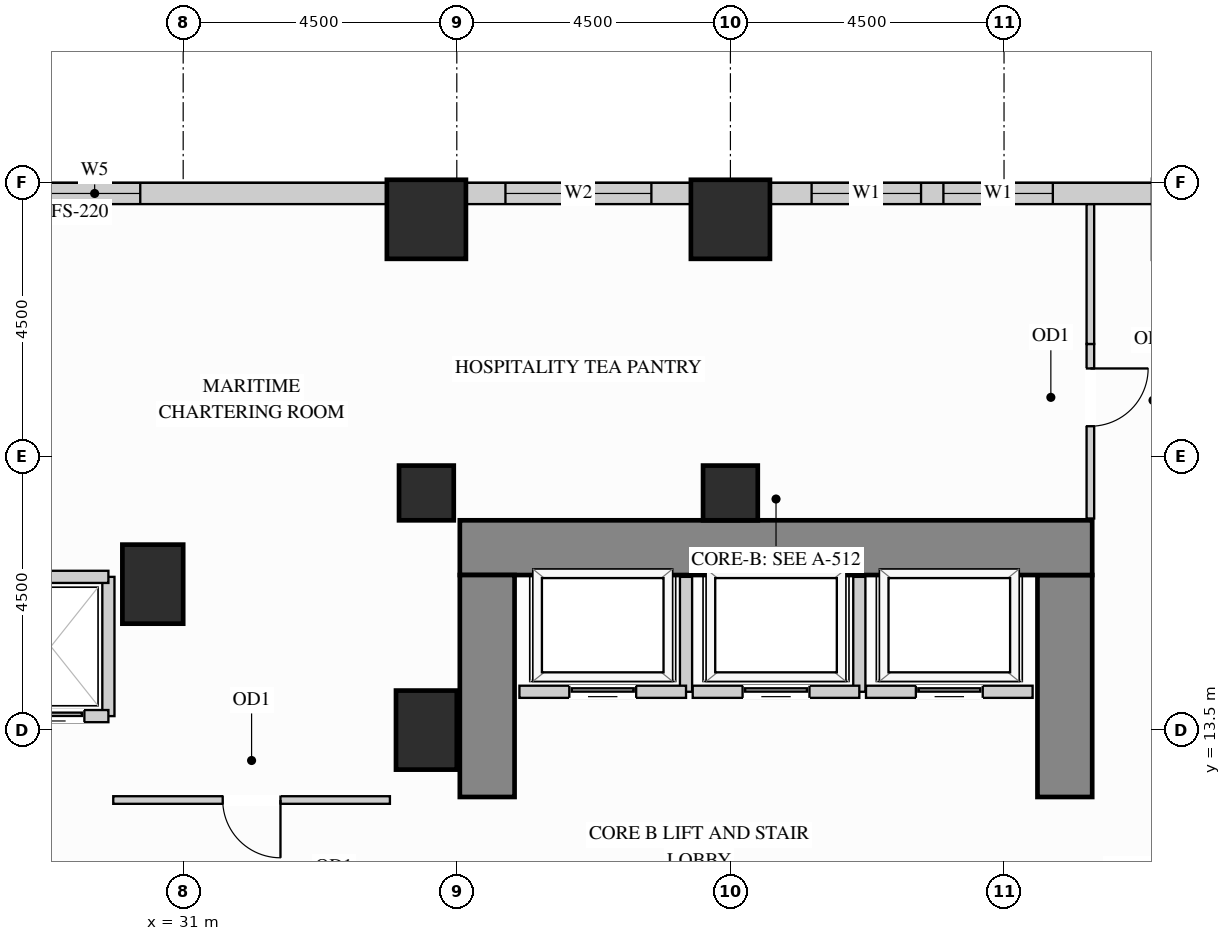
"""IFC4 building model, lengths in metres.
Left out: names, types, materials, properties, quantities, classifications, styles, units other than length and angle.
Written with IfcOpenShell. Run it as: python <this file> out.ifc"""

import sys

from ifc_helpers import new_model, si_unit, direction, frame, frame_2d, origin, origin_2d, place, context, subcontext, project, spatial, rectangle, extrude, source, transform, mapped, element, fill, save


model = new_model("IFC4")
c1 = context("Model", 3, precision=1e-05, world=origin(), true_north=direction((0.0, 1.0)))
c2 = subcontext(c1, "Body", "Model", "MODEL_VIEW")
j1 = project(units=[si_unit("LENGTHUNIT", "METRE"), si_unit("PLANEANGLEUNIT", "RADIAN")], contexts=[c1])
p1 = place(None, origin())
s1 = spatial("IfcSite", under=j1, at=p1, CompositionType="ELEMENT")
p2 = place(p1, origin())
s2 = spatial("IfcBuilding", under=s1, at=p2, CompositionType="ELEMENT")
p3 = place(p2, frame((0.0, 0.0, 40.5)))
s3 = spatial("IfcBuildingStorey", under=s2, at=p3, CompositionType="ELEMENT", Elevation=40.5)
m1 = source(origin(), c2, "Body", "SweptSolid", [
    extrude(rectangle(XDim=0.9, YDim=0.9, at=origin_2d()), origin(), (0.0, 0.0, 1.0), 3.38),
])
for number, where, z_axis, x_axis in (
    (1, (35.0, 17.4, 0.0), (0.0, 0.0, 1.0), (1.0, 0.0, 0.0)),
    (2, (40.0, 17.4, 0.0), (0.0, 0.0, 1.0), (1.0, 0.0, 0.0)),
):
    element("IfcColumn", number, at=place(p3, frame(where, z_axis=z_axis, x_axis=x_axis)), inside=s3, PredefinedType="COLUMN", context=c2, shape_type="MappedRepresentation", body=[
        mapped(m1, transform((0.0, 0.0, 0.0), x_axis=(1.0, 0.0, 0.0), y_axis=(0.0, 1.0, 0.0), z_axis=(0.0, 0.0, 1.0))),
    ])
m2 = source(origin(), c2, "Body", "SweptSolid", [
    extrude(rectangle(XDim=1.0, YDim=1.3, at=origin_2d()), origin(), (0.0, 0.0, 1.0), 3.38),
])
for number, where, z_axis, x_axis in (
    (3, (35.0, 13.5, 0.0), (0.0, 0.0, 1.0), (1.0, 0.0, 0.0)),
    (4, (30.5, 15.9, 0.0), (0.0, 0.0, 1.0), (1.0, 0.0, 0.0)),
):
    element("IfcColumn", number, at=place(p3, frame(where, z_axis=z_axis, x_axis=x_axis)), inside=s3, PredefinedType="COLUMN", context=c2, shape_type="MappedRepresentation", body=[
        mapped(m2, transform((0.0, 0.0, 0.0), x_axis=(1.0, 0.0, 0.0), y_axis=(0.0, 1.0, 0.0), z_axis=(0.0, 0.0, 1.0))),
    ])
m3 = source(origin(), c2, "Body", "SweptSolid", [
    extrude(rectangle(XDim=1.3, YDim=1.3, at=origin_2d()), origin(), (0.0, 0.0, 1.0), 3.38),
])
for number, where, z_axis, x_axis in (
    (5, (35.0, 21.9, 0.0), (0.0, 0.0, 1.0), (1.0, 0.0, 0.0)),
    (6, (40.0, 21.9, 0.0), (0.0, 0.0, 1.0), (1.0, 0.0, 0.0)),
):
    element("IfcColumn", number, at=place(p3, frame(where, z_axis=z_axis, x_axis=x_axis)), inside=s3, PredefinedType="COLUMN", context=c2, shape_type="MappedRepresentation", body=[
        mapped(m3, transform((0.0, 0.0, 0.0), x_axis=(1.0, 0.0, 0.0), y_axis=(0.0, 1.0, 0.0), z_axis=(0.0, 0.0, 1.0))),
    ])
m4 = source(origin(), c2, "Body", "SweptSolid", [
    extrude(rectangle(XDim=3.65, YDim=0.9, at=frame_2d((1.825, 0.0))), origin(), (0.0, 0.0, 1.0), 3.38),
])
p4 = place(p3, frame((45.5, 12.4, 0.0), z_axis=(0.0, 0.0, 1.0), x_axis=(0.0, 1.0, 0.0)))
e7 = element("IfcWall", 7, at=p4, inside=s3, PredefinedType="SHEAR", context=c2, shape_type="MappedRepresentation", body=[
    mapped(m4, transform((0.0, 0.0, 0.0), x_axis=(1.0, 0.0, 0.0), y_axis=(0.0, 1.0, 0.0), z_axis=(0.0, 0.0, 1.0))),
])
m5 = source(origin(), c2, "Body", "SweptSolid", [
    extrude(rectangle(XDim=10.4, YDim=0.9, at=frame_2d((5.2, 0.0))), origin(), (0.0, 0.0, 1.0), 3.38),
])
p5 = place(p3, frame((35.55, 16.5, 0.0), z_axis=(0.0, 0.0, 1.0), x_axis=(1.0, 0.0, 0.0)))
e8 = element("IfcWall", 8, at=p5, inside=s3, PredefinedType="SHEAR", context=c2, shape_type="MappedRepresentation", body=[
    mapped(m5, transform((0.0, 0.0, 0.0), x_axis=(1.0, 0.0, 0.0), y_axis=(0.0, 1.0, 0.0), z_axis=(0.0, 0.0, 1.0))),
])
p6 = place(p3, frame((36.0, 12.4, 0.0), z_axis=(0.0, 0.0, 1.0), x_axis=(0.0, 1.0, 0.0)))
e9 = element("IfcWall", 9, at=p6, inside=s3, PredefinedType="SHEAR", context=c2, shape_type="MappedRepresentation", body=[
    mapped(m4, transform((0.0, 0.0, 0.0), x_axis=(1.0, 0.0, 0.0), y_axis=(0.0, 1.0, 0.0), z_axis=(0.0, 0.0, 1.0))),
])
p7 = place(p3, frame((46.952, 22.325, 0.0), z_axis=(0.0, 0.0, 1.0), x_axis=(-1.0, 0.0, 0.0)))
e10 = element("IfcWall", 10, at=p7, inside=s3, PredefinedType="SOLIDWALL", context=c2, shape_type="SweptSolid", body=[
    extrude(rectangle(XDim=6.304, YDim=0.35, at=frame_2d((3.152, 0.0))), origin(), (0.0, 0.0, 1.0), 2.51),
])
p8 = place(p7, frame((1.649, 0.0, 0.78)))
e11 = element("IfcOpeningElement", 11, at=p8, cuts=e10, PredefinedType="OPENING", context=c2, shape_type="SweptSolid", body=[
    extrude(rectangle(XDim=1.8, YDim=1.55, at=frame_2d((0.9, 0.775))), frame((0.0, 0.185, 0.0), z_axis=(0.0, -1.0, 0.0), x_axis=(1.0, 0.0, 0.0)), (0.0, 0.0, 1.0), 0.37),
])
p9 = place(p7, frame((3.817, 0.0, 0.78)))
e12 = element("IfcOpeningElement", 12, at=p9, cuts=e10, PredefinedType="OPENING", context=c2, shape_type="SweptSolid", body=[
    extrude(rectangle(XDim=1.8, YDim=1.55, at=frame_2d((0.9, 0.775))), frame((0.0, 0.185, 0.0), z_axis=(0.0, -1.0, 0.0), x_axis=(1.0, 0.0, 0.0)), (0.0, 0.0, 1.0), 0.37),
])
p10 = place(p3, frame((39.352, 22.325, 0.0), z_axis=(0.0, 0.0, 1.0), x_axis=(-1.0, 0.0, 0.0)))
e13 = element("IfcWall", 13, at=p10, inside=s3, PredefinedType="SOLIDWALL", context=c2, shape_type="SweptSolid", body=[
    extrude(rectangle(XDim=3.704, YDim=0.35, at=frame_2d((1.852, 0.0))), origin(), (0.0, 0.0, 1.0), 2.51),
])
p11 = place(p10, frame((0.652, 0.0, 0.78)))
e14 = element("IfcOpeningElement", 14, at=p11, cuts=e13, PredefinedType="OPENING", context=c2, shape_type="SweptSolid", body=[
    extrude(rectangle(XDim=2.4, YDim=1.55, at=frame_2d((1.2, 0.775))), frame((0.0, 0.185, 0.0), z_axis=(0.0, -1.0, 0.0), x_axis=(1.0, 0.0, 0.0)), (0.0, 0.0, 1.0), 0.37),
])
p12 = place(p3, frame((34.352, 22.325, 0.0), z_axis=(0.0, 0.0, 1.0), x_axis=(-1.0, 0.0, 0.0)))
e15 = element("IfcWall", 15, at=p12, inside=s3, PredefinedType="SOLIDWALL", context=c2, shape_type="SweptSolid", body=[
    extrude(rectangle(XDim=14.854, YDim=0.35, at=frame_2d((7.427, 0.0))), origin(), (0.0, 0.0, 1.0), 3.365),
])
p13 = place(p12, frame((4.058, 0.0, 0.78)))
e16 = element("IfcOpeningElement", 16, at=p13, cuts=e15, PredefinedType="OPENING", context=c2, shape_type="SweptSolid", body=[
    extrude(rectangle(XDim=1.5, YDim=2.0, at=frame_2d((0.75, 1.0))), frame((0.0, 0.185, 0.0), z_axis=(0.0, -1.0, 0.0), x_axis=(1.0, 0.0, 0.0)), (0.0, 0.0, 1.0), 0.37),
])
p14 = place(p12, frame((9.296, 0.0, 0.78)))
e17 = element("IfcOpeningElement", 17, at=p14, cuts=e15, PredefinedType="OPENING", context=c2, shape_type="SweptSolid", body=[
    extrude(rectangle(XDim=1.5, YDim=2.0, at=frame_2d((0.75, 1.0))), frame((0.0, 0.185, 0.0), z_axis=(0.0, -1.0, 0.0), x_axis=(1.0, 0.0, 0.0)), (0.0, 0.0, 1.0), 0.37),
])
p15 = place(p3, frame((45.92, 16.98, 0.0), z_axis=(0.0, 0.0, 1.0), x_axis=(0.0, 1.0, 0.0)))
e18 = element("IfcWall", 18, at=p15, inside=s3, PredefinedType="PARTITIONING", context=c2, shape_type="SweptSolid", body=[
    extrude(rectangle(XDim=2.87, YDim=0.125, at=frame_2d((1.435, 0.0))), origin(), (0.0, 0.0, 1.0), 3.365),
])
p16 = place(p15, frame((1.517, 0.0, 0.0)))
e19 = element("IfcOpeningElement", 19, at=p16, cuts=e18, PredefinedType="OPENING", context=c2, shape_type="SweptSolid", body=[
    extrude(rectangle(XDim=0.95, YDim=2.15, at=frame_2d((0.475, 1.075))), frame((0.0, 0.073, 0.0), z_axis=(0.0, -1.0, 0.0), x_axis=(1.0, 0.0, 0.0)), (0.0, 0.0, 1.0), 0.145),
])
m6 = source(origin(), c2, "Body", "SweptSolid", [
    extrude(rectangle(XDim=2.298, YDim=0.125, at=frame_2d((1.149, 0.0))), origin(), (0.0, 0.0, 1.0), 3.365),
])
p17 = place(p3, frame((45.92, 19.85, 0.0), z_axis=(0.0, 0.0, 1.0), x_axis=(0.0, 1.0, 0.0)))
e20 = element("IfcWall", 20, at=p17, inside=s3, PredefinedType="PARTITIONING", context=c2, shape_type="MappedRepresentation", body=[
    mapped(m6, transform((0.0, 0.0, 0.0), x_axis=(1.0, 0.0, 0.0), y_axis=(0.0, 1.0, 0.0), z_axis=(0.0, 0.0, 1.0))),
])
p18 = place(p3, frame((29.85, 12.35, 0.0), z_axis=(0.0, 0.0, 1.0), x_axis=(1.0, 0.0, 0.0)))
e21 = element("IfcWall", 21, at=p18, inside=s3, PredefinedType="PARTITIONING", context=c2, shape_type="SweptSolid", body=[
    extrude(rectangle(XDim=4.55, YDim=0.125, at=frame_2d((2.275, 0.0))), origin(), (0.0, 0.0, 1.0), 3.365),
])
p19 = place(p18, frame((1.8, 0.0, 0.0)))
e22 = element("IfcOpeningElement", 22, at=p19, cuts=e21, PredefinedType="OPENING", context=c2, shape_type="SweptSolid", body=[
    extrude(rectangle(XDim=0.95, YDim=2.15, at=frame_2d((0.475, 1.075))), frame((0.0, 0.073, 0.0), z_axis=(0.0, -1.0, 0.0), x_axis=(1.0, 0.0, 0.0)), (0.0, 0.0, 1.0), 0.145),
])
m7 = source(origin(), c2, "Body", "SweptSolid", [
    extrude(rectangle(XDim=1.89, YDim=0.2, at=frame_2d((0.945, 0.0))), origin(), (0.0, 0.0, 1.0), 3.365),
])
p20 = place(p3, frame((39.27, 14.13, 0.0), z_axis=(0.0, 0.0, 1.0), x_axis=(0.0, 1.0, 0.0)))
e23 = element("IfcWall", 23, at=p20, inside=s3, PredefinedType="PARTITIONING", context=c2, shape_type="MappedRepresentation", body=[
    mapped(m7, transform((0.0, 0.0, 0.0), x_axis=(1.0, 0.0, 0.0), y_axis=(0.0, 1.0, 0.0), z_axis=(0.0, 0.0, 1.0))),
])
p21 = place(p3, frame((36.53, 14.13, 0.0), z_axis=(0.0, 0.0, 1.0), x_axis=(1.0, 0.0, 0.0)))
e24 = element("IfcWall", 24, at=p21, inside=s3, PredefinedType="PARTITIONING", context=c2, shape_type="SweptSolid", body=[
    extrude(rectangle(XDim=2.74, YDim=0.2, at=frame_2d((1.37, 0.0))), origin(), (0.0, 0.0, 1.0), 3.365),
])
p22 = place(p21, frame((0.82, 0.0, 0.0)))
e25 = element("IfcOpeningElement", 25, at=p22, cuts=e24, PredefinedType="OPENING", context=c2, shape_type="SweptSolid", body=[
    extrude(rectangle(XDim=1.1, YDim=2.2, at=frame_2d((0.55, 1.1))), frame((0.0, 0.11, 0.0), z_axis=(0.0, -1.0, 0.0), x_axis=(1.0, 0.0, 0.0)), (0.0, 0.0, 1.0), 0.22),
])
p23 = place(p3, frame((42.12, 14.13, 0.0), z_axis=(0.0, 0.0, 1.0), x_axis=(0.0, 1.0, 0.0)))
e26 = element("IfcWall", 26, at=p23, inside=s3, PredefinedType="PARTITIONING", context=c2, shape_type="MappedRepresentation", body=[
    mapped(m7, transform((0.0, 0.0, 0.0), x_axis=(1.0, 0.0, 0.0), y_axis=(0.0, 1.0, 0.0), z_axis=(0.0, 0.0, 1.0))),
])
p24 = place(p3, frame((39.38, 14.13, 0.0), z_axis=(0.0, 0.0, 1.0), x_axis=(1.0, 0.0, 0.0)))
e27 = element("IfcWall", 27, at=p24, inside=s3, PredefinedType="PARTITIONING", context=c2, shape_type="SweptSolid", body=[
    extrude(rectangle(XDim=2.74, YDim=0.2, at=frame_2d((1.37, 0.0))), origin(), (0.0, 0.0, 1.0), 3.365),
])
p25 = place(p24, frame((0.82, 0.0, 0.0)))
e28 = element("IfcOpeningElement", 28, at=p25, cuts=e27, PredefinedType="OPENING", context=c2, shape_type="SweptSolid", body=[
    extrude(rectangle(XDim=1.1, YDim=2.2, at=frame_2d((0.55, 1.1))), frame((0.0, 0.11, 0.0), z_axis=(0.0, -1.0, 0.0), x_axis=(1.0, 0.0, 0.0)), (0.0, 0.0, 1.0), 0.22),
])
p26 = place(p3, frame((42.23, 14.13, 0.0), z_axis=(0.0, 0.0, 1.0), x_axis=(1.0, 0.0, 0.0)))
e29 = element("IfcWall", 29, at=p26, inside=s3, PredefinedType="PARTITIONING", context=c2, shape_type="SweptSolid", body=[
    extrude(rectangle(XDim=2.74, YDim=0.2, at=frame_2d((1.37, 0.0))), origin(), (0.0, 0.0, 1.0), 3.365),
])
p27 = place(p26, frame((0.82, 0.0, 0.0)))
e30 = element("IfcOpeningElement", 30, at=p27, cuts=e29, PredefinedType="OPENING", context=c2, shape_type="SweptSolid", body=[
    extrude(rectangle(XDim=1.1, YDim=2.2, at=frame_2d((0.55, 1.1))), frame((0.0, 0.11, 0.0), z_axis=(0.0, -1.0, 0.0), x_axis=(1.0, 0.0, 0.0)), (0.0, 0.0, 1.0), 0.22),
])
m8 = source(origin(), c2, "Body", "SweptSolid", [
    extrude(rectangle(XDim=2.29, YDim=0.2, at=frame_2d((1.145, 0.0))), origin(), (0.0, 0.0, 1.0), 3.365),
])
p28 = place(p3, frame((29.77, 13.73, 0.0), z_axis=(0.0, 0.0, 1.0), x_axis=(0.0, 1.0, 0.0)))
e31 = element("IfcWall", 31, at=p28, inside=s3, PredefinedType="PARTITIONING", context=c2, shape_type="MappedRepresentation", body=[
    mapped(m8, transform((0.0, 0.0, 0.0), x_axis=(1.0, 0.0, 0.0), y_axis=(0.0, 1.0, 0.0), z_axis=(0.0, 0.0, 1.0))),
])
m9 = source(origin(), c2, "Body", "SweptSolid", [
    extrude(rectangle(XDim=1.89, YDim=0.2, at=frame_2d((0.945, 0.0))), origin(), (0.0, 0.0, 1.0), 2.67),
])
p29 = place(p3, frame((27.88, 16.02, 0.0), z_axis=(0.0, 0.0, 1.0), x_axis=(1.0, 0.0, 0.0)))
e32 = element("IfcWall", 32, at=p29, inside=s3, PredefinedType="PARTITIONING", context=c2, shape_type="MappedRepresentation", body=[
    mapped(m9, transform((0.0, 0.0, 0.0), x_axis=(1.0, 0.0, 0.0), y_axis=(0.0, 1.0, 0.0), z_axis=(0.0, 0.0, 1.0))),
])
p30 = place(p3, frame((27.88, 13.73, 0.0), z_axis=(0.0, 0.0, 1.0), x_axis=(1.0, 0.0, 0.0)))
e33 = element("IfcWall", 33, at=p30, inside=s3, PredefinedType="PARTITIONING", context=c2, shape_type="SweptSolid", body=[
    extrude(rectangle(XDim=1.89, YDim=0.2, at=frame_2d((0.945, 0.0))), origin(), (0.0, 0.0, 1.0), 2.446),
])
p31 = place(p30, frame((0.395, 0.0, 0.0)))
e34 = element("IfcOpeningElement", 34, at=p31, cuts=e33, PredefinedType="OPENING", context=c2, shape_type="SweptSolid", body=[
    extrude(rectangle(XDim=1.1, YDim=2.2, at=frame_2d((0.55, 1.1))), frame((0.0, 0.11, 0.0), z_axis=(0.0, -1.0, 0.0), x_axis=(1.0, 0.0, 0.0)), (0.0, 0.0, 1.0), 0.22),
])
m10 = source(origin(), c2, "Body", "SweptSolid", [
    extrude(rectangle(XDim=1.1, YDim=2.2, at=frame_2d((0.55, 1.1))), frame((0.0, 0.025, 0.0), z_axis=(0.0, -1.0, 0.0), x_axis=(1.0, 0.0, 0.0)), (0.0, 0.0, 1.0), 0.05),
])
p32 = place(p22, origin())
e35 = element("IfcDoor", 35, at=p32, inside=s3, OperationType="SLIDING_TO_LEFT", PredefinedType="DOOR", context=c2, shape_type="MappedRepresentation", body=[
    mapped(m10, transform((0.0, 0.0, 0.0), x_axis=(1.0, 0.0, 0.0), y_axis=(0.0, 1.0, 0.0), z_axis=(0.0, 0.0, 1.0))),
])
fill(e25, e35)
p33 = place(p25, origin())
e36 = element("IfcDoor", 36, at=p33, inside=s3, OperationType="SLIDING_TO_LEFT", PredefinedType="DOOR", context=c2, shape_type="MappedRepresentation", body=[
    mapped(m10, transform((0.0, 0.0, 0.0), x_axis=(1.0, 0.0, 0.0), y_axis=(0.0, 1.0, 0.0), z_axis=(0.0, 0.0, 1.0))),
])
fill(e28, e36)
p34 = place(p27, origin())
e37 = element("IfcDoor", 37, at=p34, inside=s3, OperationType="SLIDING_TO_LEFT", PredefinedType="DOOR", context=c2, shape_type="MappedRepresentation", body=[
    mapped(m10, transform((0.0, 0.0, 0.0), x_axis=(1.0, 0.0, 0.0), y_axis=(0.0, 1.0, 0.0), z_axis=(0.0, 0.0, 1.0))),
])
fill(e30, e37)
p35 = place(p31, origin())
e38 = element("IfcDoor", 38, at=p35, inside=s3, OperationType="SLIDING_TO_LEFT", PredefinedType="DOOR", context=c2, shape_type="MappedRepresentation", body=[
    mapped(m10, transform((0.0, 0.0, 0.0), x_axis=(1.0, 0.0, 0.0), y_axis=(0.0, 1.0, 0.0), z_axis=(0.0, 0.0, 1.0))),
])
fill(e34, e38)
m11 = source(origin(), c2, "Body", "SweptSolid", [
    extrude(rectangle(XDim=0.95, YDim=2.15, at=frame_2d((0.475, 1.075))), frame((0.0, 0.025, 0.0), z_axis=(0.0, -1.0, 0.0), x_axis=(1.0, 0.0, 0.0)), (0.0, 0.0, 1.0), 0.05),
])
p36 = place(p16, origin())
e39 = element("IfcDoor", 39, at=p36, inside=s3, OperationType="SINGLE_SWING_RIGHT", PredefinedType="DOOR", context=c2, shape_type="MappedRepresentation", body=[
    mapped(m11, transform((0.0, 0.0, 0.0), x_axis=(1.0, 0.0, 0.0), y_axis=(0.0, 1.0, 0.0), z_axis=(0.0, 0.0, 1.0))),
])
fill(e19, e39)
p37 = place(p19, origin())
e40 = element("IfcDoor", 40, at=p37, inside=s3, OperationType="SINGLE_SWING_RIGHT", PredefinedType="DOOR", context=c2, shape_type="MappedRepresentation", body=[
    mapped(m11, transform((0.0, 0.0, 0.0), x_axis=(1.0, 0.0, 0.0), y_axis=(0.0, 1.0, 0.0), z_axis=(0.0, 0.0, 1.0))),
])
fill(e22, e40)
m12 = source(origin(), c2, "Body", "SweptSolid", [
    extrude(rectangle(XDim=1.8, YDim=1.55, at=frame_2d((0.9, 0.775))), frame((0.0, 0.03, 0.0), z_axis=(0.0, -1.0, 0.0), x_axis=(1.0, 0.0, 0.0)), (0.0, 0.0, 1.0), 0.06),
])
p38 = place(p8, origin())
e41 = element("IfcWindow", 41, at=p38, inside=s3, PartitioningType="SINGLE_PANEL", PredefinedType="WINDOW", context=c2, shape_type="MappedRepresentation", body=[
    mapped(m12, transform((0.0, 0.0, 0.0), x_axis=(1.0, 0.0, 0.0), y_axis=(0.0, 1.0, 0.0), z_axis=(0.0, 0.0, 1.0))),
])
fill(e11, e41)
p39 = place(p9, origin())
e42 = element("IfcWindow", 42, at=p39, inside=s3, PartitioningType="SINGLE_PANEL", PredefinedType="WINDOW", context=c2, shape_type="MappedRepresentation", body=[
    mapped(m12, transform((0.0, 0.0, 0.0), x_axis=(1.0, 0.0, 0.0), y_axis=(0.0, 1.0, 0.0), z_axis=(0.0, 0.0, 1.0))),
])
fill(e12, e42)
m13 = source(origin(), c2, "Body", "SweptSolid", [
    extrude(rectangle(XDim=2.4, YDim=1.55, at=frame_2d((1.2, 0.775))), frame((0.0, 0.03, 0.0), z_axis=(0.0, -1.0, 0.0), x_axis=(1.0, 0.0, 0.0)), (0.0, 0.0, 1.0), 0.06),
])
p40 = place(p11, origin())
e43 = element("IfcWindow", 43, at=p40, inside=s3, PartitioningType="SINGLE_PANEL", PredefinedType="WINDOW", context=c2, shape_type="MappedRepresentation", body=[
    mapped(m13, transform((0.0, 0.0, 0.0), x_axis=(1.0, 0.0, 0.0), y_axis=(0.0, 1.0, 0.0), z_axis=(0.0, 0.0, 1.0))),
])
fill(e14, e43)
m14 = source(origin(), c2, "Body", "SweptSolid", [
    extrude(rectangle(XDim=1.5, YDim=2.0, at=frame_2d((0.75, 1.0))), frame((0.0, 0.03, 0.0), z_axis=(0.0, -1.0, 0.0), x_axis=(1.0, 0.0, 0.0)), (0.0, 0.0, 1.0), 0.06),
])
p41 = place(p13, origin())
e44 = element("IfcWindow", 44, at=p41, inside=s3, PartitioningType="SINGLE_PANEL", PredefinedType="WINDOW", context=c2, shape_type="MappedRepresentation", body=[
    mapped(m14, transform((0.0, 0.0, 0.0), x_axis=(1.0, 0.0, 0.0), y_axis=(0.0, 1.0, 0.0), z_axis=(0.0, 0.0, 1.0))),
])
fill(e16, e44)
save(model, sys.argv[1])
